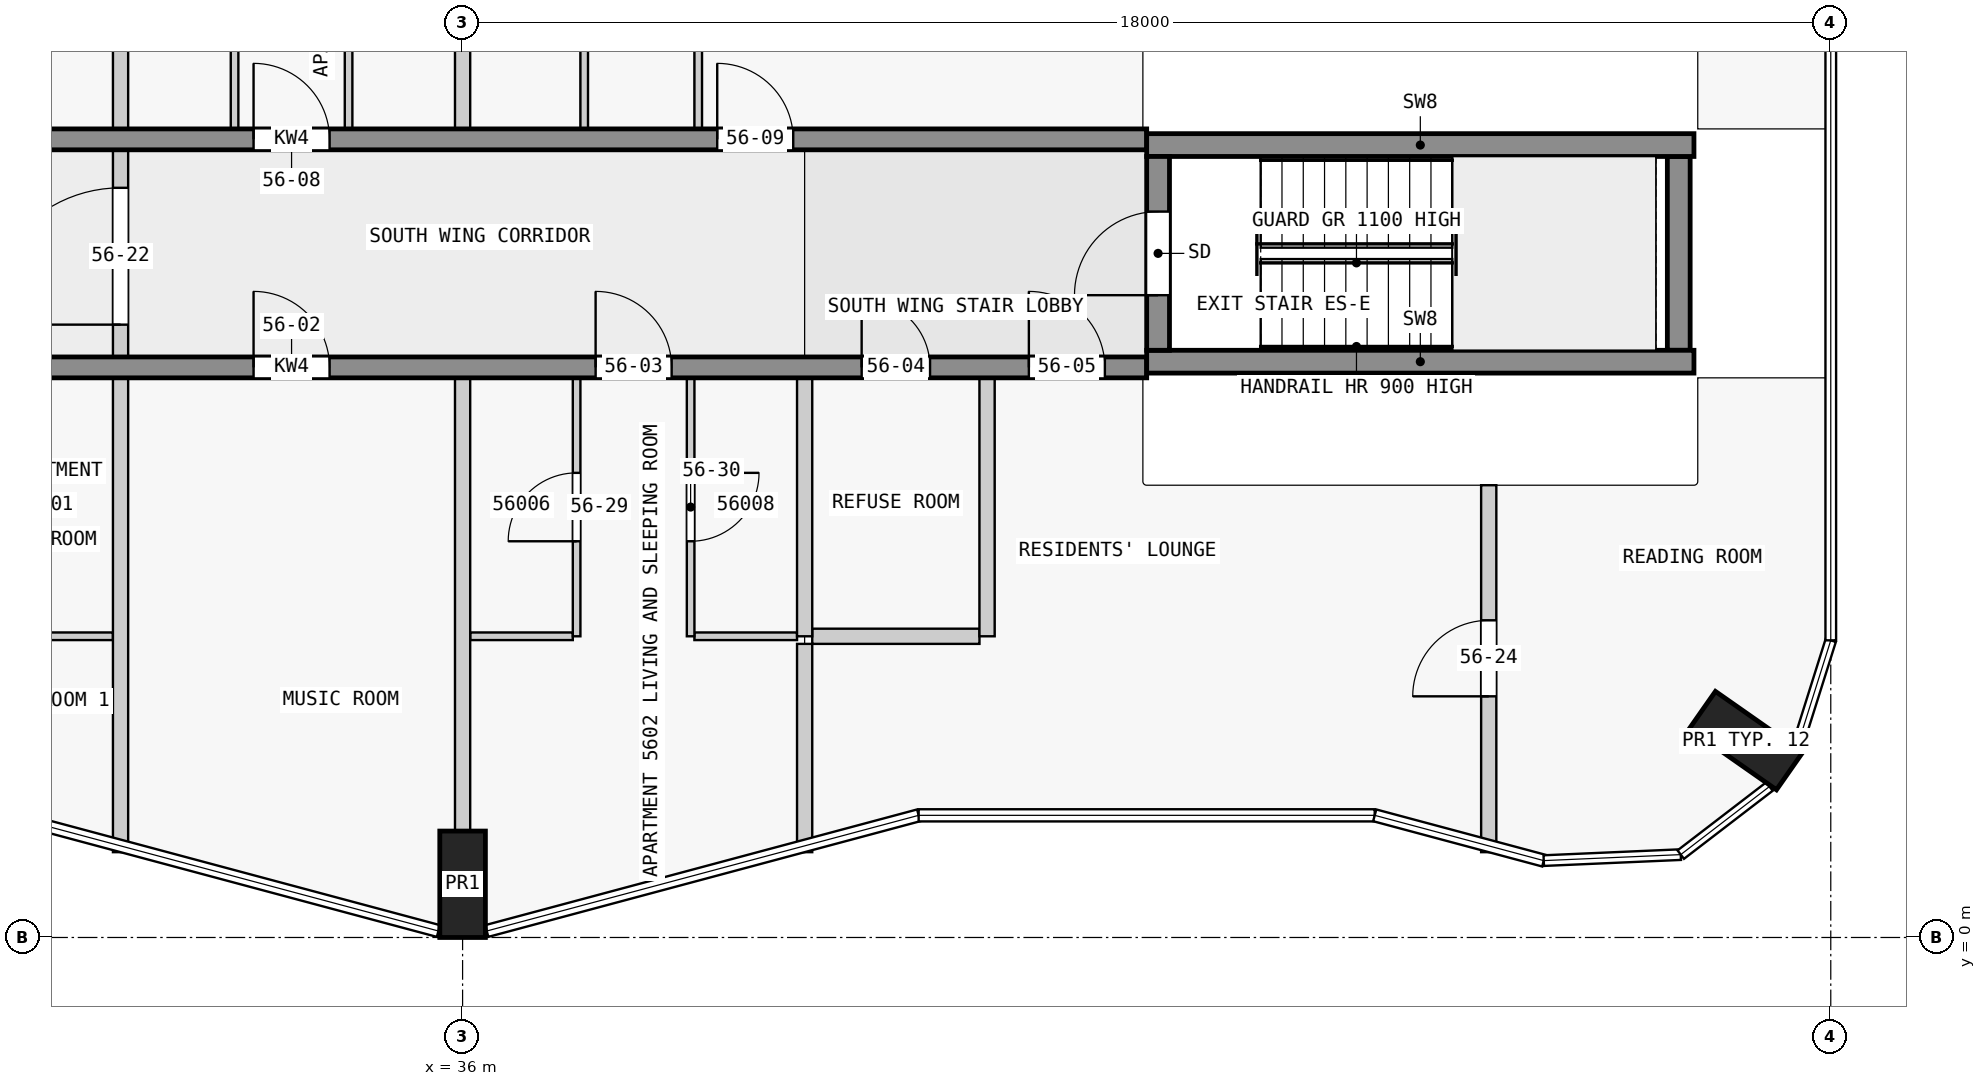
"""IFC4 building model, lengths in metres.
Left out: names, types, materials, properties, quantities, classifications, styles, units other than length and angle.
Written with IfcOpenShell. Run it as: python <this file> out.ifc"""

import sys

from ifc_helpers import new_model, si_unit, direction, frame, frame_2d, origin, origin_2d, place, context, subcontext, project, spatial, rectangle, extrude, element, fill, save


model = new_model("IFC4")
c1 = context("Model", 3, precision=1e-05, world=origin(), true_north=direction((0.0, 1.0)))
c2 = subcontext(c1, "Body", "Model", "MODEL_VIEW")
j1 = project(units=[si_unit("LENGTHUNIT", "METRE"), si_unit("PLANEANGLEUNIT", "RADIAN")], contexts=[c1])
p1 = place(None, origin())
s1 = spatial("IfcSite", under=j1, at=p1, CompositionType="ELEMENT")
p2 = place(p1, origin())
s2 = spatial("IfcBuilding", under=s1, at=p2, CompositionType="ELEMENT")
p3 = place(p2, frame((0.0, 0.0, 215.4)))
s3 = spatial("IfcBuildingStorey", under=s2, at=p3, CompositionType="ELEMENT", Elevation=215.4)
for number, where, z_axis, x_axis in (
    (1, (36.0, 0.7, 0.0), (0.0, 0.0, 1.0), (1.0, 0.0, 0.0)),
    (2, (52.884, 2.59, 0.0), (0.0, 0.0, 1.0), (0.574, 0.819, 0.0)),
):
    element("IfcColumn", number, at=place(p3, frame(where, z_axis=z_axis, x_axis=x_axis)), inside=s3, PredefinedType="COLUMN", context=c2, shape_type="SweptSolid", body=[
        extrude(rectangle(XDim=0.6, YDim=1.4, at=origin_2d()), origin(), (0.0, 0.0, 1.0), 3.5),
    ])
p4 = place(p3, frame((45.15, 7.725, 0.0), z_axis=(0.0, 0.0, 1.0), x_axis=(0.0, 1.0, 0.0)))
e3 = element("IfcWall", 3, at=p4, inside=s3, PredefinedType="SHEAR", context=c2, shape_type="SweptSolid", body=[
    extrude(rectangle(XDim=2.55, YDim=0.3, at=frame_2d((1.275, 0.0))), origin(), (0.0, 0.0, 1.0), 3.5),
])
p5 = place(p4, frame((0.725, 0.0, 0.0)))
e4 = element("IfcOpeningElement", 4, at=p5, cuts=e3, PredefinedType="OPENING", context=c2, shape_type="SweptSolid", body=[
    extrude(rectangle(XDim=1.1, YDim=2.1, at=frame_2d((0.55, 1.05))), frame((0.0, 0.16, 0.0), z_axis=(0.0, -1.0, 0.0), x_axis=(1.0, 0.0, 0.0)), (0.0, 0.0, 1.0), 0.32),
])
p6 = place(p3, frame((52.0, 7.725, 0.0), z_axis=(0.0, 0.0, 1.0), x_axis=(0.0, 1.0, 0.0)))
e5 = element("IfcWall", 5, at=p6, inside=s3, PredefinedType="SHEAR", context=c2, shape_type="SweptSolid", body=[
    extrude(rectangle(XDim=2.55, YDim=0.3, at=frame_2d((1.275, 0.0))), origin(), (0.0, 0.0, 1.0), 3.5),
])
for number, where, z_axis, x_axis in (
    (6, (45.0, 7.575, 0.0), (0.0, 0.0, 1.0), (1.0, 0.0, 0.0)),
    (7, (45.0, 10.425, 0.0), (0.0, 0.0, 1.0), (1.0, 0.0, 0.0)),
):
    element("IfcWall", number, at=place(p3, frame(where, z_axis=z_axis, x_axis=x_axis)), inside=s3, PredefinedType="SHEAR", context=c2, shape_type="SweptSolid", body=[
        extrude(rectangle(XDim=7.2, YDim=0.3, at=frame_2d((3.6, 0.0))), origin(), (0.0, 0.0, 1.0), 3.5),
    ])
p7 = place(p3, frame((22.5, 7.5, 0.0), z_axis=(0.0, 0.0, 1.0), x_axis=(1.0, 0.0, 0.0)))
e8 = element("IfcWall", 8, at=p7, inside=s3, PredefinedType="SHEAR", context=c2, shape_type="SweptSolid", body=[
    extrude(rectangle(XDim=22.5, YDim=0.275, at=frame_2d((11.25, 0.0))), origin(), (0.0, 0.0, 1.0), 3.25),
])
p8 = place(p7, frame((4.05, 0.0, 0.0)))
e9 = element("IfcOpeningElement", 9, at=p8, cuts=e8, PredefinedType="OPENING", context=c2, shape_type="SweptSolid", body=[
    extrude(rectangle(XDim=1.0, YDim=2.1, at=frame_2d((0.5, 1.05))), frame((0.0, 0.147, 0.0), z_axis=(0.0, -1.0, 0.0), x_axis=(1.0, 0.0, 0.0)), (0.0, 0.0, 1.0), 0.295),
])
p9 = place(p7, frame((10.75, 0.0, 0.0)))
e10 = element("IfcOpeningElement", 10, at=p9, cuts=e8, PredefinedType="OPENING", context=c2, shape_type="SweptSolid", body=[
    extrude(rectangle(XDim=1.0, YDim=2.1, at=frame_2d((0.5, 1.05))), frame((0.0, 0.147, 0.0), z_axis=(0.0, -1.0, 0.0), x_axis=(1.0, 0.0, 0.0)), (0.0, 0.0, 1.0), 0.295),
])
p10 = place(p7, frame((15.25, 0.0, 0.0)))
e11 = element("IfcOpeningElement", 11, at=p10, cuts=e8, PredefinedType="OPENING", context=c2, shape_type="SweptSolid", body=[
    extrude(rectangle(XDim=1.0, YDim=2.1, at=frame_2d((0.5, 1.05))), frame((0.0, 0.147, 0.0), z_axis=(0.0, -1.0, 0.0), x_axis=(1.0, 0.0, 0.0)), (0.0, 0.0, 1.0), 0.295),
])
p11 = place(p7, frame((18.75, 0.0, 0.0)))
e12 = element("IfcOpeningElement", 12, at=p11, cuts=e8, PredefinedType="OPENING", context=c2, shape_type="SweptSolid", body=[
    extrude(rectangle(XDim=0.9, YDim=2.1, at=frame_2d((0.45, 1.05))), frame((0.0, 0.147, 0.0), z_axis=(0.0, -1.0, 0.0), x_axis=(1.0, 0.0, 0.0)), (0.0, 0.0, 1.0), 0.295),
])
p12 = place(p7, frame((20.95, 0.0, 0.0)))
e13 = element("IfcOpeningElement", 13, at=p12, cuts=e8, PredefinedType="OPENING", context=c2, shape_type="SweptSolid", body=[
    extrude(rectangle(XDim=1.0, YDim=2.1, at=frame_2d((0.5, 1.05))), frame((0.0, 0.147, 0.0), z_axis=(0.0, -1.0, 0.0), x_axis=(1.0, 0.0, 0.0)), (0.0, 0.0, 1.0), 0.295),
])
p13 = place(p3, frame((22.5, 10.5, 0.0), z_axis=(0.0, 0.0, 1.0), x_axis=(1.0, 0.0, 0.0)))
e14 = element("IfcWall", 14, at=p13, inside=s3, PredefinedType="SHEAR", context=c2, shape_type="SweptSolid", body=[
    extrude(rectangle(XDim=22.5, YDim=0.275, at=frame_2d((11.25, 0.0))), origin(), (0.0, 0.0, 1.0), 3.25),
])
p14 = place(p13, frame((1.75, 0.0, 0.0)))
e15 = element("IfcOpeningElement", 15, at=p14, cuts=e14, PredefinedType="OPENING", context=c2, shape_type="SweptSolid", body=[
    extrude(rectangle(XDim=1.0, YDim=2.1, at=frame_2d((0.5, 1.05))), frame((0.0, 0.147, 0.0), z_axis=(0.0, -1.0, 0.0), x_axis=(1.0, 0.0, 0.0)), (0.0, 0.0, 1.0), 0.295),
])
p15 = place(p13, frame((5.85, 0.0, 0.0)))
e16 = element("IfcOpeningElement", 16, at=p15, cuts=e14, PredefinedType="OPENING", context=c2, shape_type="SweptSolid", body=[
    extrude(rectangle(XDim=1.8, YDim=2.1, at=frame_2d((0.9, 1.05))), frame((0.0, 0.147, 0.0), z_axis=(0.0, -1.0, 0.0), x_axis=(1.0, 0.0, 0.0)), (0.0, 0.0, 1.0), 0.295),
])
p16 = place(p13, frame((10.75, 0.0, 0.0)))
e17 = element("IfcOpeningElement", 17, at=p16, cuts=e14, PredefinedType="OPENING", context=c2, shape_type="SweptSolid", body=[
    extrude(rectangle(XDim=1.0, YDim=2.1, at=frame_2d((0.5, 1.05))), frame((0.0, 0.147, 0.0), z_axis=(0.0, -1.0, 0.0), x_axis=(1.0, 0.0, 0.0)), (0.0, 0.0, 1.0), 0.295),
])
p17 = place(p13, frame((16.85, 0.0, 0.0)))
e18 = element("IfcOpeningElement", 18, at=p17, cuts=e14, PredefinedType="OPENING", context=c2, shape_type="SweptSolid", body=[
    extrude(rectangle(XDim=1.0, YDim=2.1, at=frame_2d((0.5, 1.05))), frame((0.0, 0.147, 0.0), z_axis=(0.0, -1.0, 0.0), x_axis=(1.0, 0.0, 0.0)), (0.0, 0.0, 1.0), 0.295),
])
p18 = place(p3, frame((29.75, 3.962, 0.0), z_axis=(0.0, 0.0, 1.0), x_axis=(1.0, 0.0, 0.0)))
e19 = element("IfcWall", 19, at=p18, inside=s3, PredefinedType="PARTITIONING", context=c2, shape_type="SweptSolid", body=[
    extrude(rectangle(XDim=1.65, YDim=0.1, at=frame_2d((0.825, 0.0))), origin(), (0.0, 0.0, 1.0), 3.25),
])
for number, where, z_axis, x_axis in (
    (20, (36.1, 3.962, 0.0), (0.0, 0.0, 1.0), (1.0, 0.0, 0.0)),
    (21, (39.05, 3.962, 0.0), (0.0, 0.0, 1.0), (1.0, 0.0, 0.0)),
):
    element("IfcWall", number, at=place(p3, frame(where, z_axis=z_axis, x_axis=x_axis)), inside=s3, PredefinedType="PARTITIONING", context=c2, shape_type="SweptSolid", body=[
        extrude(rectangle(XDim=1.35, YDim=0.1, at=frame_2d((0.675, 0.0))), origin(), (0.0, 0.0, 1.0), 3.25),
    ])
p19 = place(p3, frame((40.6, 3.962, 0.0), z_axis=(0.0, 0.0, 1.0), x_axis=(1.0, 0.0, 0.0)))
e22 = element("IfcWall", 22, at=p19, inside=s3, PredefinedType="PARTITIONING", context=c2, shape_type="SweptSolid", body=[
    extrude(rectangle(XDim=2.2, YDim=0.2, at=frame_2d((1.1, 0.0))), origin(), (0.0, 0.0, 1.0), 3.25),
])
for number, where, z_axis, x_axis in (
    (23, (31.5, 1.122, 0.0), (0.0, 0.0, 1.0), (0.0, 1.0, 0.0)),
    (24, (31.5, 10.637, 0.0), (0.0, 0.0, 1.0), (0.0, 1.0, 0.0)),
):
    element("IfcWall", number, at=place(p3, frame(where, z_axis=z_axis, x_axis=x_axis)), inside=s3, PredefinedType="PARTITIONING", context=c2, shape_type="SweptSolid", body=[
        extrude(rectangle(XDim=6.24, YDim=0.2, at=frame_2d((3.12, 0.0))), origin(), (0.0, 0.0, 1.0), 3.25),
    ])
p20 = place(p3, frame((33.0, 10.637, 0.0), z_axis=(0.0, 0.0, 1.0), x_axis=(0.0, 1.0, 0.0)))
e25 = element("IfcWall", 25, at=p20, inside=s3, PredefinedType="PARTITIONING", context=c2, shape_type="SweptSolid", body=[
    extrude(rectangle(XDim=3.4, YDim=0.1, at=frame_2d((1.7, 0.0))), origin(), (0.0, 0.0, 1.0), 3.25),
])
p21 = place(p20, frame((1.25, 0.0, 0.0)))
e26 = element("IfcOpeningElement", 26, at=p21, cuts=e25, PredefinedType="OPENING", context=c2, shape_type="SweptSolid", body=[
    extrude(rectangle(XDim=0.9, YDim=2.1, at=frame_2d((0.45, 1.05))), frame((0.0, 0.06, 0.0), z_axis=(0.0, -1.0, 0.0), x_axis=(1.0, 0.0, 0.0)), (0.0, 0.0, 1.0), 0.12),
])
p22 = place(p3, frame((34.5, 13.988, 0.0), z_axis=(0.0, 0.0, 1.0), x_axis=(0.0, -1.0, 0.0)))
e27 = element("IfcWall", 27, at=p22, inside=s3, PredefinedType="PARTITIONING", context=c2, shape_type="SweptSolid", body=[
    extrude(rectangle(XDim=3.35, YDim=0.1, at=frame_2d((1.675, 0.0))), origin(), (0.0, 0.0, 1.0), 3.25),
])
p23 = place(p22, frame((1.25, 0.0, 0.0)))
e28 = element("IfcOpeningElement", 28, at=p23, cuts=e27, PredefinedType="OPENING", context=c2, shape_type="SweptSolid", body=[
    extrude(rectangle(XDim=0.9, YDim=2.1, at=frame_2d((0.45, 1.05))), frame((0.0, 0.06, 0.0), z_axis=(0.0, -1.0, 0.0), x_axis=(1.0, 0.0, 0.0)), (0.0, 0.0, 1.0), 0.12),
])
p24 = place(p3, frame((36.0, 1.4, 0.0), z_axis=(0.0, 0.0, 1.0), x_axis=(0.0, 1.0, 0.0)))
e29 = element("IfcWall", 29, at=p24, inside=s3, PredefinedType="PARTITIONING", context=c2, shape_type="SweptSolid", body=[
    extrude(rectangle(XDim=5.963, YDim=0.2, at=frame_2d((2.981, 0.0))), origin(), (0.0, 0.0, 1.0), 3.25),
])
p25 = place(p3, frame((36.0, 10.637, 0.0), z_axis=(0.0, 0.0, 1.0), x_axis=(0.0, 1.0, 0.0)))
e30 = element("IfcWall", 30, at=p25, inside=s3, PredefinedType="PARTITIONING", context=c2, shape_type="SweptSolid", body=[
    extrude(rectangle(XDim=3.4, YDim=0.2, at=frame_2d((1.7, 0.0))), origin(), (0.0, 0.0, 1.0), 3.25),
])
p26 = place(p3, frame((37.5, 3.962, 0.0), z_axis=(0.0, 0.0, 1.0), x_axis=(0.0, 1.0, 0.0)))
e31 = element("IfcWall", 31, at=p26, inside=s3, PredefinedType="PARTITIONING", context=c2, shape_type="SweptSolid", body=[
    extrude(rectangle(XDim=3.4, YDim=0.1, at=frame_2d((1.7, 0.0))), origin(), (0.0, 0.0, 1.0), 3.25),
])
p27 = place(p26, frame((1.25, 0.0, 0.0)))
e32 = element("IfcOpeningElement", 32, at=p27, cuts=e31, PredefinedType="OPENING", context=c2, shape_type="SweptSolid", body=[
    extrude(rectangle(XDim=0.9, YDim=2.1, at=frame_2d((0.45, 1.05))), frame((0.0, 0.06, 0.0), z_axis=(0.0, -1.0, 0.0), x_axis=(1.0, 0.0, 0.0)), (0.0, 0.0, 1.0), 0.12),
])
p28 = place(p3, frame((37.6, 10.637, 0.0), z_axis=(0.0, 0.0, 1.0), x_axis=(0.0, 1.0, 0.0)))
e33 = element("IfcWall", 33, at=p28, inside=s3, PredefinedType="PARTITIONING", context=c2, shape_type="SweptSolid", body=[
    extrude(rectangle(XDim=3.35, YDim=0.1, at=frame_2d((1.675, 0.0))), origin(), (0.0, 0.0, 1.0), 3.25),
])
p29 = place(p3, frame((39.0, 7.363, 0.0), z_axis=(0.0, 0.0, 1.0), x_axis=(0.0, -1.0, 0.0)))
e34 = element("IfcWall", 34, at=p29, inside=s3, PredefinedType="PARTITIONING", context=c2, shape_type="SweptSolid", body=[
    extrude(rectangle(XDim=3.4, YDim=0.1, at=frame_2d((1.7, 0.0))), origin(), (0.0, 0.0, 1.0), 3.25),
])
p30 = place(p29, frame((1.25, 0.0, 0.0)))
e35 = element("IfcOpeningElement", 35, at=p30, cuts=e34, PredefinedType="OPENING", context=c2, shape_type="SweptSolid", body=[
    extrude(rectangle(XDim=0.9, YDim=2.1, at=frame_2d((0.45, 1.05))), frame((0.0, 0.06, 0.0), z_axis=(0.0, -1.0, 0.0), x_axis=(1.0, 0.0, 0.0)), (0.0, 0.0, 1.0), 0.12),
])
p31 = place(p3, frame((39.1, 10.637, 0.0), z_axis=(0.0, 0.0, 1.0), x_axis=(0.0, 1.0, 0.0)))
e36 = element("IfcWall", 36, at=p31, inside=s3, PredefinedType="PARTITIONING", context=c2, shape_type="SweptSolid", body=[
    extrude(rectangle(XDim=3.35, YDim=0.1, at=frame_2d((1.675, 0.0))), origin(), (0.0, 0.0, 1.0), 3.25),
])
p32 = place(p31, frame((1.25, 0.0, 0.0)))
e37 = element("IfcOpeningElement", 37, at=p32, cuts=e36, PredefinedType="OPENING", context=c2, shape_type="SweptSolid", body=[
    extrude(rectangle(XDim=0.9, YDim=2.1, at=frame_2d((0.45, 1.05))), frame((0.0, 0.06, 0.0), z_axis=(0.0, -1.0, 0.0), x_axis=(1.0, 0.0, 0.0)), (0.0, 0.0, 1.0), 0.12),
])
p33 = place(p3, frame((40.5, 3.863, 0.0), z_axis=(0.0, 0.0, 1.0), x_axis=(0.0, -1.0, 0.0)))
e38 = element("IfcWall", 38, at=p33, inside=s3, PredefinedType="PARTITIONING", context=c2, shape_type="SweptSolid", body=[
    extrude(rectangle(XDim=2.74, YDim=0.2, at=frame_2d((1.37, 0.0))), origin(), (0.0, 0.0, 1.0), 3.25),
])
for number, where, z_axis, x_axis in (
    (39, (40.5, 3.962, 0.0), (0.0, 0.0, 1.0), (0.0, 1.0, 0.0)),
    (40, (42.9, 3.962, 0.0), (0.0, 0.0, 1.0), (0.0, 1.0, 0.0)),
):
    element("IfcWall", number, at=place(p3, frame(where, z_axis=z_axis, x_axis=x_axis)), inside=s3, PredefinedType="PARTITIONING", context=c2, shape_type="SweptSolid", body=[
        extrude(rectangle(XDim=3.4, YDim=0.2, at=frame_2d((1.7, 0.0))), origin(), (0.0, 0.0, 1.0), 3.25),
    ])
p34 = place(p3, frame((49.5, 1.122, 0.0), z_axis=(0.0, 0.0, 1.0), x_axis=(0.0, 1.0, 0.0)))
e41 = element("IfcWall", 41, at=p34, inside=s3, PredefinedType="PARTITIONING", context=c2, shape_type="SweptSolid", body=[
    extrude(rectangle(XDim=4.828, YDim=0.2, at=frame_2d((2.414, 0.0))), origin(), (0.0, 0.0, 1.0), 3.25),
])
p35 = place(p34, frame((2.05, 0.0, 0.0)))
e42 = element("IfcOpeningElement", 42, at=p35, cuts=e41, PredefinedType="OPENING", context=c2, shape_type="SweptSolid", body=[
    extrude(rectangle(XDim=1.0, YDim=2.1, at=frame_2d((0.5, 1.05))), frame((0.0, 0.11, 0.0), z_axis=(0.0, -1.0, 0.0), x_axis=(1.0, 0.0, 0.0)), (0.0, 0.0, 1.0), 0.22),
])
p36 = place(p3, frame((31.5, 7.462, 0.0), z_axis=(0.0, 0.0, 1.0), x_axis=(0.0, 1.0, 0.0)))
e43 = element("IfcWall", 43, at=p36, inside=s3, PredefinedType="PARTITIONING", context=c2, shape_type="SweptSolid", body=[
    extrude(rectangle(XDim=3.075, YDim=0.2, at=frame_2d((1.538, 0.0))), origin(), (0.0, 0.0, 1.0), 3.25),
])
p37 = place(p36, frame((0.6, 0.0, 0.0)))
e44 = element("IfcOpeningElement", 44, at=p37, cuts=e43, PredefinedType="OPENING", context=c2, shape_type="SweptSolid", body=[
    extrude(rectangle(XDim=1.8, YDim=2.1, at=frame_2d((0.9, 1.05))), frame((0.0, 0.11, 0.0), z_axis=(0.0, -1.0, 0.0), x_axis=(1.0, 0.0, 0.0)), (0.0, 0.0, 1.0), 0.22),
])
p38 = place(p5, origin())
e45 = element("IfcDoor", 45, at=p38, inside=s3, OperationType="SINGLE_SWING_LEFT", PredefinedType="DOOR", context=c2, shape_type="SweptSolid", body=[
    extrude(rectangle(XDim=1.1, YDim=2.1, at=frame_2d((0.55, 1.05))), frame((0.0, 0.025, 0.0), z_axis=(0.0, -1.0, 0.0), x_axis=(1.0, 0.0, 0.0)), (0.0, 0.0, 1.0), 0.05),
])
fill(e4, e45)
p39 = place(p9, origin())
e46 = element("IfcDoor", 46, at=p39, inside=s3, OperationType="SINGLE_SWING_LEFT", PredefinedType="DOOR", context=c2, shape_type="SweptSolid", body=[
    extrude(rectangle(XDim=1.0, YDim=2.1, at=frame_2d((0.5, 1.05))), frame((0.0, 0.025, 0.0), z_axis=(0.0, -1.0, 0.0), x_axis=(1.0, 0.0, 0.0)), (0.0, 0.0, 1.0), 0.05),
])
fill(e10, e46)
p40 = place(p10, origin())
e47 = element("IfcDoor", 47, at=p40, inside=s3, OperationType="SINGLE_SWING_RIGHT", PredefinedType="DOOR", context=c2, shape_type="SweptSolid", body=[
    extrude(rectangle(XDim=1.0, YDim=2.1, at=frame_2d((0.5, 1.05))), frame((0.0, 0.025, 0.0), z_axis=(0.0, -1.0, 0.0), x_axis=(1.0, 0.0, 0.0)), (0.0, 0.0, 1.0), 0.05),
])
fill(e11, e47)
p41 = place(p11, origin())
e48 = element("IfcDoor", 48, at=p41, inside=s3, OperationType="SINGLE_SWING_RIGHT", PredefinedType="DOOR", context=c2, shape_type="SweptSolid", body=[
    extrude(rectangle(XDim=0.9, YDim=2.1, at=frame_2d((0.45, 1.05))), frame((0.0, 0.025, 0.0), z_axis=(0.0, -1.0, 0.0), x_axis=(1.0, 0.0, 0.0)), (0.0, 0.0, 1.0), 0.05),
])
fill(e12, e48)
p42 = place(p12, origin())
e49 = element("IfcDoor", 49, at=p42, inside=s3, OperationType="SINGLE_SWING_RIGHT", PredefinedType="DOOR", context=c2, shape_type="SweptSolid", body=[
    extrude(rectangle(XDim=1.0, YDim=2.1, at=frame_2d((0.5, 1.05))), frame((0.0, 0.025, 0.0), z_axis=(0.0, -1.0, 0.0), x_axis=(1.0, 0.0, 0.0)), (0.0, 0.0, 1.0), 0.05),
])
fill(e13, e49)
p43 = place(p16, origin())
e50 = element("IfcDoor", 50, at=p43, inside=s3, OperationType="SINGLE_SWING_LEFT", PredefinedType="DOOR", context=c2, shape_type="SweptSolid", body=[
    extrude(rectangle(XDim=1.0, YDim=2.1, at=frame_2d((0.5, 1.05))), frame((0.0, 0.025, 0.0), z_axis=(0.0, -1.0, 0.0), x_axis=(1.0, 0.0, 0.0)), (0.0, 0.0, 1.0), 0.05),
])
fill(e17, e50)
p44 = place(p17, origin())
e51 = element("IfcDoor", 51, at=p44, inside=s3, OperationType="SINGLE_SWING_RIGHT", PredefinedType="DOOR", context=c2, shape_type="SweptSolid", body=[
    extrude(rectangle(XDim=1.0, YDim=2.1, at=frame_2d((0.5, 1.05))), frame((0.0, 0.025, 0.0), z_axis=(0.0, -1.0, 0.0), x_axis=(1.0, 0.0, 0.0)), (0.0, 0.0, 1.0), 0.05),
])
fill(e18, e51)
p45 = place(p37, origin())
e52 = element("IfcDoor", 52, at=p45, inside=s3, OperationType="SINGLE_SWING_LEFT", PredefinedType="DOOR", context=c2, shape_type="SweptSolid", body=[
    extrude(rectangle(XDim=1.8, YDim=2.1, at=frame_2d((0.9, 1.05))), frame((0.0, 0.025, 0.0), z_axis=(0.0, -1.0, 0.0), x_axis=(1.0, 0.0, 0.0)), (0.0, 0.0, 1.0), 0.05),
])
fill(e44, e52)
p46 = place(p35, origin())
e53 = element("IfcDoor", 53, at=p46, inside=s3, OperationType="SINGLE_SWING_RIGHT", PredefinedType="DOOR", context=c2, shape_type="SweptSolid", body=[
    extrude(rectangle(XDim=1.0, YDim=2.1, at=frame_2d((0.5, 1.05))), frame((0.0, 0.025, 0.0), z_axis=(0.0, -1.0, 0.0), x_axis=(1.0, 0.0, 0.0)), (0.0, 0.0, 1.0), 0.05),
])
fill(e42, e53)
p47 = place(p27, origin())
e54 = element("IfcDoor", 54, at=p47, inside=s3, OperationType="SINGLE_SWING_LEFT", PredefinedType="DOOR", context=c2, shape_type="SweptSolid", body=[
    extrude(rectangle(XDim=0.9, YDim=2.1, at=frame_2d((0.45, 1.05))), frame((0.0, 0.025, 0.0), z_axis=(0.0, -1.0, 0.0), x_axis=(1.0, 0.0, 0.0)), (0.0, 0.0, 1.0), 0.05),
])
fill(e32, e54)
p48 = place(p30, origin())
e55 = element("IfcDoor", 55, at=p48, inside=s3, OperationType="SINGLE_SWING_LEFT", PredefinedType="DOOR", context=c2, shape_type="SweptSolid", body=[
    extrude(rectangle(XDim=0.9, YDim=2.1, at=frame_2d((0.45, 1.05))), frame((0.0, 0.025, 0.0), z_axis=(0.0, -1.0, 0.0), x_axis=(1.0, 0.0, 0.0)), (0.0, 0.0, 1.0), 0.05),
])
fill(e35, e55)
save(model, sys.argv[1])
